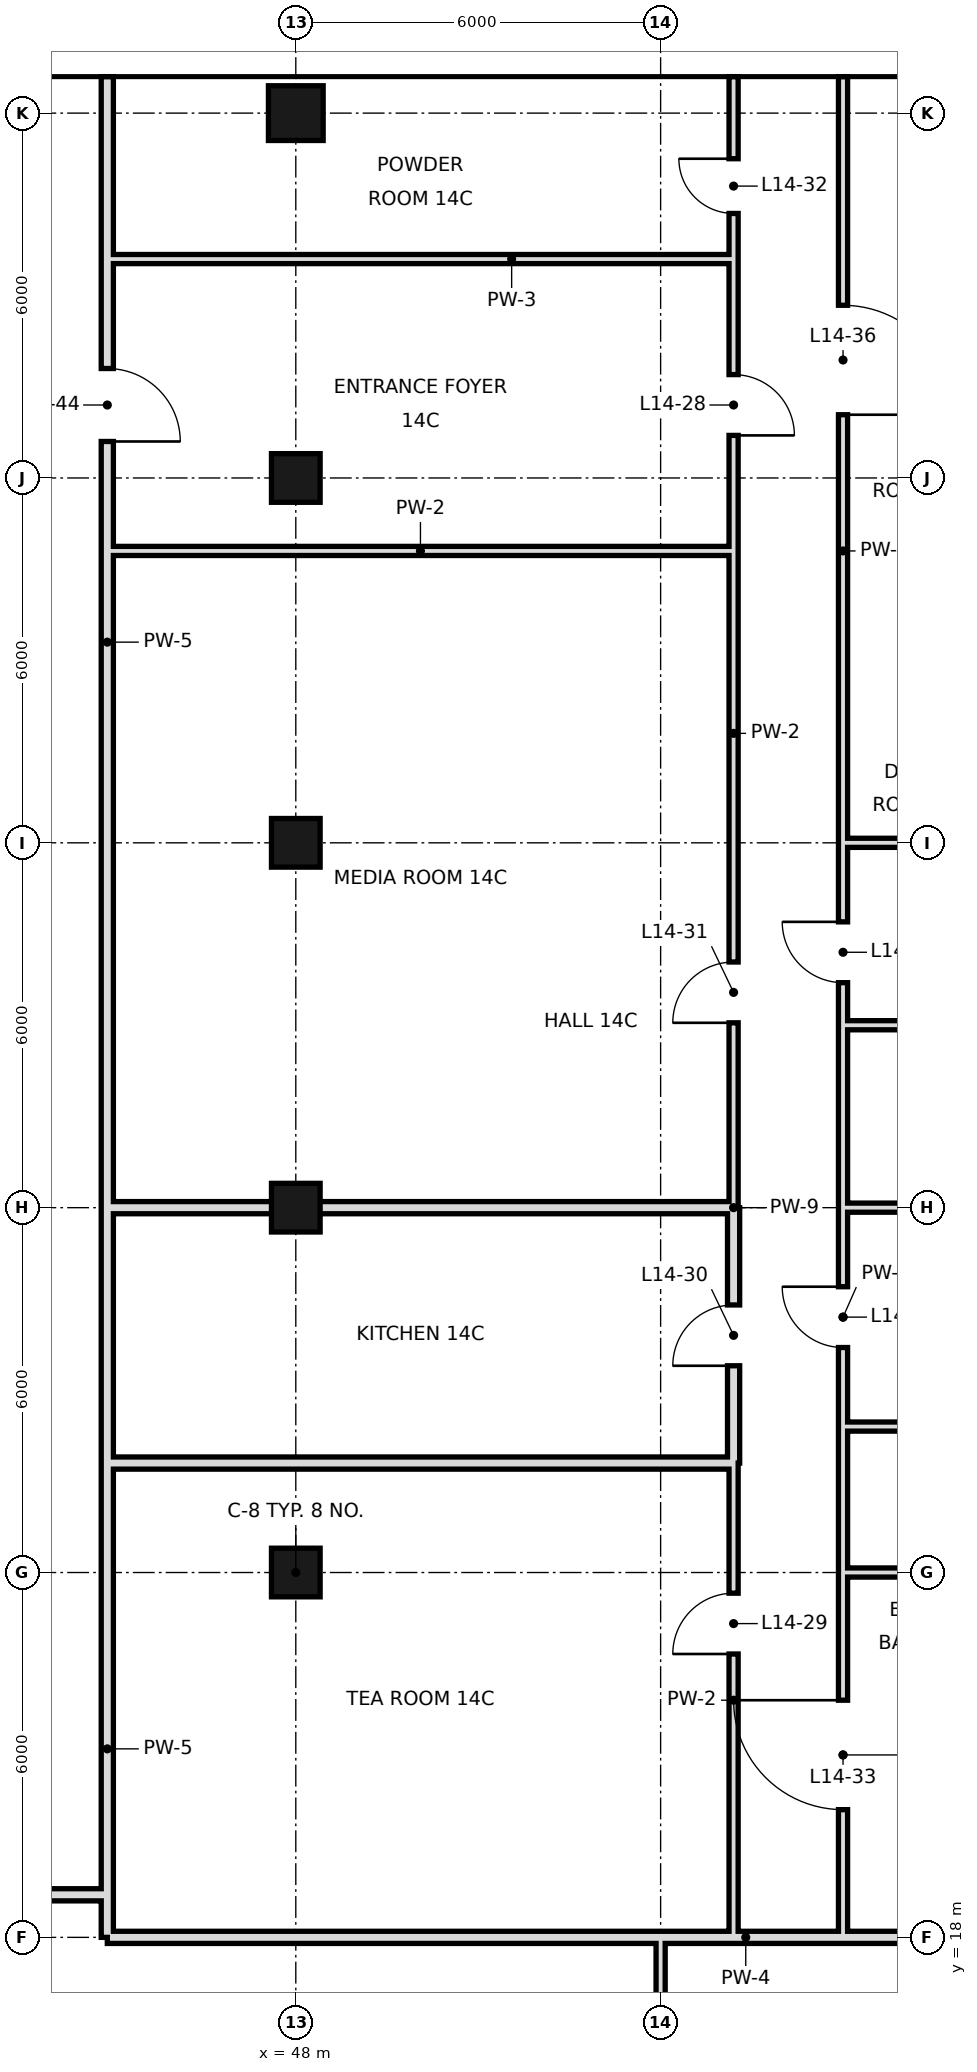
"""IFC4 building model, lengths in metres.
Left out: names, types, materials, properties, quantities, classifications, styles, units other than length and angle.
Written with IfcOpenShell. Run it as: python <this file> out.ifc"""

import sys

from ifc_helpers import new_model, si_unit, direction, frame, frame_2d, origin, origin_2d, place, context, subcontext, project, spatial, rectangle, hollow_rectangle, extrude, element, fill, save


model = new_model("IFC4")
c1 = context("Model", 3, precision=1e-05, world=origin(), true_north=direction((0.0, 1.0)))
c2 = subcontext(c1, "Body", "Model", "MODEL_VIEW")
j1 = project(units=[si_unit("LENGTHUNIT", "METRE"), si_unit("PLANEANGLEUNIT", "RADIAN")], contexts=[c1])
p1 = place(None, origin())
s1 = spatial("IfcSite", under=j1, at=p1, CompositionType="ELEMENT")
p2 = place(p1, origin())
s2 = spatial("IfcBuilding", under=s1, at=p2, CompositionType="ELEMENT")
p3 = place(p2, frame((0.0, 0.0, 71.4)))
s3 = spatial("IfcBuildingStorey", under=s2, at=p3, CompositionType="ELEMENT", Elevation=71.4)
for number, where, z_axis, x_axis in (
    (1, (48.0, 24.0, 0.0), (0.0, 0.0, 1.0), (1.0, 0.0, 0.0)),
    (2, (48.0, 30.0, 0.0), (0.0, 0.0, 1.0), (1.0, 0.0, 0.0)),
    (3, (48.0, 36.0, 0.0), (0.0, 0.0, 1.0), (1.0, 0.0, 0.0)),
    (4, (48.0, 42.0, 0.0), (0.0, 0.0, 1.0), (1.0, 0.0, 0.0)),
):
    element("IfcColumn", number, at=place(p3, frame(where, z_axis=z_axis, x_axis=x_axis)), inside=s3, PredefinedType="COLUMN", context=c2, shape_type="SweptSolid", body=[
        extrude(hollow_rectangle(XDim=0.8, YDim=0.8, WallThickness=0.04, at=origin_2d()), origin(), (0.0, 0.0, 1.0), 3.6),
    ])
p4 = place(p3, frame((48.0, 48.0, 0.0), z_axis=(0.0, 0.0, 1.0), x_axis=(1.0, 0.0, 0.0)))
e5 = element("IfcColumn", 5, at=p4, inside=s3, PredefinedType="COLUMN", context=c2, shape_type="SweptSolid", body=[
    extrude(hollow_rectangle(XDim=0.9, YDim=0.9, WallThickness=0.045, at=origin_2d()), origin(), (0.0, 0.0, 1.0), 3.6),
])
p5 = place(p3, frame((44.9, 18.7, 0.0), z_axis=(0.0, 0.0, 1.0), x_axis=(0.0, 1.0, 0.0)))
e6 = element("IfcWall", 6, at=p5, inside=s3, PredefinedType="SOLIDWALL", context=c2, shape_type="SweptSolid", body=[
    extrude(rectangle(XDim=7.1, YDim=0.2, at=frame_2d((3.55, 0.0))), origin(), (0.0, 0.0, 1.0), 3.42),
])
p6 = place(p3, frame((44.9, 30.0, 0.0), z_axis=(0.0, 0.0, 1.0), x_axis=(0.0, 1.0, 0.0)))
e7 = element("IfcWall", 7, at=p6, inside=s3, PredefinedType="SOLIDWALL", context=c2, shape_type="SweptSolid", body=[
    extrude(rectangle(XDim=18.6, YDim=0.2, at=frame_2d((9.3, 0.0))), origin(), (0.0, 0.0, 1.0), 2.72),
])
p7 = place(p6, frame((12.6, 0.0, 0.0)))
e8 = element("IfcOpeningElement", 8, at=p7, cuts=e7, PredefinedType="OPENING", context=c2, shape_type="SweptSolid", body=[
    extrude(rectangle(XDim=1.2, YDim=2.4, at=frame_2d((0.6, 1.2))), frame((0.0, 0.11, 0.0), z_axis=(0.0, -1.0, 0.0), x_axis=(1.0, 0.0, 0.0)), (0.0, 0.0, 1.0), 0.22),
])
p8 = place(p3, frame((44.9, 25.8, 0.0), z_axis=(0.0, 0.0, 1.0), x_axis=(0.0, 1.0, 0.0)))
e9 = element("IfcWall", 9, at=p8, inside=s3, PredefinedType="SOLIDWALL", context=c2, shape_type="SweptSolid", body=[
    extrude(rectangle(XDim=4.2, YDim=0.2, at=frame_2d((2.1, 0.0))), origin(), (0.0, 0.0, 1.0), 2.97),
])
p9 = place(p3, frame((44.9, 18.0, 0.0), z_axis=(0.0, 0.0, 1.0), x_axis=(0.0, 1.0, 0.0)))
e10 = element("IfcWall", 10, at=p9, inside=s3, PredefinedType="SOLIDWALL", context=c2, shape_type="SweptSolid", body=[
    extrude(rectangle(XDim=0.7, YDim=0.2, at=frame_2d((0.35, 0.0))), origin(), (0.0, 0.0, 1.0), 2.97),
])
p10 = place(p3, frame((54.0, 10.8, 0.0), z_axis=(0.0, 0.0, 1.0), x_axis=(0.0, 1.0, 0.0)))
e11 = element("IfcWall", 11, at=p10, inside=s3, PredefinedType="PARTITIONING", context=c2, shape_type="SweptSolid", body=[
    extrude(rectangle(XDim=7.2, YDim=0.15, at=frame_2d((3.6, 0.0))), origin(), (0.0, 0.0, 1.0), 3.42),
])
p11 = place(p3, frame((55.2, 25.8, 0.0), z_axis=(0.0, 0.0, 1.0), x_axis=(0.0, 1.0, 0.0)))
e12 = element("IfcWall", 12, at=p11, inside=s3, PredefinedType="SOLIDWALL", context=c2, shape_type="SweptSolid", body=[
    extrude(rectangle(XDim=4.2, YDim=0.2, at=frame_2d((2.1, 0.0))), origin(), (0.0, 0.0, 1.0), 2.52),
])
p12 = place(p11, frame((1.6, 0.0, 0.0)))
e13 = element("IfcOpeningElement", 13, at=p12, cuts=e12, PredefinedType="OPENING", context=c2, shape_type="SweptSolid", body=[
    extrude(rectangle(XDim=1.0, YDim=2.4, at=frame_2d((0.5, 1.2))), frame((0.0, 0.11, 0.0), z_axis=(0.0, -1.0, 0.0), x_axis=(1.0, 0.0, 0.0)), (0.0, 0.0, 1.0), 0.22),
])
p13 = place(p3, frame((55.2, 18.0, 0.0), z_axis=(0.0, 0.0, 1.0), x_axis=(0.0, 1.0, 0.0)))
e14 = element("IfcWall", 14, at=p13, inside=s3, PredefinedType="PARTITIONING", context=c2, shape_type="SweptSolid", body=[
    extrude(rectangle(XDim=7.8, YDim=0.15, at=frame_2d((3.9, 0.0))), origin(), (0.0, 0.0, 1.0), 3.42),
])
p14 = place(p13, frame((4.66, 0.0, 0.0)))
e15 = element("IfcOpeningElement", 15, at=p14, cuts=e14, PredefinedType="OPENING", context=c2, shape_type="SweptSolid", body=[
    extrude(rectangle(XDim=1.0, YDim=2.4, at=frame_2d((0.5, 1.2))), frame((0.0, 0.085, 0.0), z_axis=(0.0, -1.0, 0.0), x_axis=(1.0, 0.0, 0.0)), (0.0, 0.0, 1.0), 0.17),
])
p15 = place(p3, frame((55.2, 30.0, 0.0), z_axis=(0.0, 0.0, 1.0), x_axis=(0.0, 1.0, 0.0)))
e16 = element("IfcWall", 16, at=p15, inside=s3, PredefinedType="PARTITIONING", context=c2, shape_type="SweptSolid", body=[
    extrude(rectangle(XDim=15.6, YDim=0.15, at=frame_2d((7.8, 0.0))), origin(), (0.0, 0.0, 1.0), 3.42),
])
p16 = place(p15, frame((12.7, 0.0, 0.0)))
e17 = element("IfcOpeningElement", 17, at=p16, cuts=e16, PredefinedType="OPENING", context=c2, shape_type="SweptSolid", body=[
    extrude(rectangle(XDim=1.0, YDim=2.4, at=frame_2d((0.5, 1.2))), frame((0.0, 0.085, 0.0), z_axis=(0.0, -1.0, 0.0), x_axis=(1.0, 0.0, 0.0)), (0.0, 0.0, 1.0), 0.17),
])
p17 = place(p15, frame((3.04, 0.0, 0.0)))
e18 = element("IfcOpeningElement", 18, at=p17, cuts=e16, PredefinedType="OPENING", context=c2, shape_type="SweptSolid", body=[
    extrude(rectangle(XDim=1.0, YDim=2.4, at=frame_2d((0.5, 1.2))), frame((0.0, 0.085, 0.0), z_axis=(0.0, -1.0, 0.0), x_axis=(1.0, 0.0, 0.0)), (0.0, 0.0, 1.0), 0.17),
])
p18 = place(p3, frame((55.2, 45.6, 0.0), z_axis=(0.0, 0.0, 1.0), x_axis=(0.0, 1.0, 0.0)))
e19 = element("IfcWall", 19, at=p18, inside=s3, PredefinedType="PARTITIONING", context=c2, shape_type="SweptSolid", body=[
    extrude(rectangle(XDim=3.0, YDim=0.15, at=frame_2d((1.5, 0.0))), origin(), (0.0, 0.0, 1.0), 3.42),
])
p19 = place(p18, frame((0.75, 0.0, 0.0)))
e20 = element("IfcOpeningElement", 20, at=p19, cuts=e19, PredefinedType="OPENING", context=c2, shape_type="SweptSolid", body=[
    extrude(rectangle(XDim=0.9, YDim=2.4, at=frame_2d((0.45, 1.2))), frame((0.0, 0.085, 0.0), z_axis=(0.0, -1.0, 0.0), x_axis=(1.0, 0.0, 0.0)), (0.0, 0.0, 1.0), 0.17),
])
p20 = place(p3, frame((57.0, 18.0, 0.0), z_axis=(0.0, 0.0, 1.0), x_axis=(0.0, 1.0, 0.0)))
e21 = element("IfcWall", 21, at=p20, inside=s3, PredefinedType="PARTITIONING", context=c2, shape_type="SweptSolid", body=[
    extrude(rectangle(XDim=6.0, YDim=0.15, at=frame_2d((3.0, 0.0))), origin(), (0.0, 0.0, 1.0), 3.42),
])
p21 = place(p20, frame((2.1, 0.0, 0.0)))
e22 = element("IfcOpeningElement", 22, at=p21, cuts=e21, PredefinedType="OPENING", context=c2, shape_type="SweptSolid", body=[
    extrude(rectangle(XDim=1.8, YDim=2.4, at=frame_2d((0.9, 1.2))), frame((0.0, 0.085, 0.0), z_axis=(0.0, -1.0, 0.0), x_axis=(1.0, 0.0, 0.0)), (0.0, 0.0, 1.0), 0.17),
])
p22 = place(p3, frame((57.0, 26.4, 0.0), z_axis=(0.0, 0.0, 1.0), x_axis=(0.0, 1.0, 0.0)))
e23 = element("IfcWall", 23, at=p22, inside=s3, PredefinedType="PARTITIONING", context=c2, shape_type="SweptSolid", body=[
    extrude(rectangle(XDim=3.6, YDim=0.15, at=frame_2d((1.8, 0.0))), origin(), (0.0, 0.0, 1.0), 3.42),
])
p23 = place(p22, frame((1.3, 0.0, 0.0)))
e24 = element("IfcOpeningElement", 24, at=p23, cuts=e23, PredefinedType="OPENING", context=c2, shape_type="SweptSolid", body=[
    extrude(rectangle(XDim=1.0, YDim=2.4, at=frame_2d((0.5, 1.2))), frame((0.0, 0.085, 0.0), z_axis=(0.0, -1.0, 0.0), x_axis=(1.0, 0.0, 0.0)), (0.0, 0.0, 1.0), 0.17),
])
p24 = place(p3, frame((57.0, 33.0, 0.0), z_axis=(0.0, 0.0, 1.0), x_axis=(0.0, 1.0, 0.0)))
e25 = element("IfcWall", 25, at=p24, inside=s3, PredefinedType="PARTITIONING", context=c2, shape_type="SweptSolid", body=[
    extrude(rectangle(XDim=15.6, YDim=0.15, at=frame_2d((7.8, 0.0))), origin(), (0.0, 0.0, 1.0), 3.42),
])
p25 = place(p24, frame((0.7, 0.0, 0.0)))
e26 = element("IfcOpeningElement", 26, at=p25, cuts=e25, PredefinedType="OPENING", context=c2, shape_type="SweptSolid", body=[
    extrude(rectangle(XDim=1.0, YDim=2.4, at=frame_2d((0.5, 1.2))), frame((0.0, 0.085, 0.0), z_axis=(0.0, -1.0, 0.0), x_axis=(1.0, 0.0, 0.0)), (0.0, 0.0, 1.0), 0.17),
])
p26 = place(p24, frame((10.04, 0.0, 0.0)))
e27 = element("IfcOpeningElement", 27, at=p26, cuts=e25, PredefinedType="OPENING", context=c2, shape_type="SweptSolid", body=[
    extrude(rectangle(XDim=1.8, YDim=2.4, at=frame_2d((0.9, 1.2))), frame((0.0, 0.085, 0.0), z_axis=(0.0, -1.0, 0.0), x_axis=(1.0, 0.0, 0.0)), (0.0, 0.0, 1.0), 0.17),
])
p27 = place(p3, frame((57.0, 24.0, 0.0), z_axis=(0.0, 0.0, 1.0), x_axis=(0.0, 1.0, 0.0)))
e28 = element("IfcWall", 28, at=p27, inside=s3, PredefinedType="PARTITIONING", context=c2, shape_type="SweptSolid", body=[
    extrude(rectangle(XDim=2.4, YDim=0.15, at=frame_2d((1.2, 0.0))), origin(), (0.0, 0.0, 1.0), 3.42),
])
p28 = place(p3, frame((57.0, 30.0, 0.0), z_axis=(0.0, 0.0, 1.0), x_axis=(0.0, 1.0, 0.0)))
e29 = element("IfcWall", 29, at=p28, inside=s3, PredefinedType="PARTITIONING", context=c2, shape_type="SweptSolid", body=[
    extrude(rectangle(XDim=3.0, YDim=0.15, at=frame_2d((1.5, 0.0))), origin(), (0.0, 0.0, 1.0), 3.42),
])
p29 = place(p3, frame((44.9, 18.0, 0.0), z_axis=(0.0, 0.0, 1.0), x_axis=(1.0, 0.0, 0.0)))
e30 = element("IfcWall", 30, at=p29, inside=s3, PredefinedType="SOLIDWALL", context=c2, shape_type="SweptSolid", body=[
    extrude(rectangle(XDim=21.7, YDim=0.2, at=frame_2d((10.85, 0.0))), origin(), (0.0, 0.0, 1.0), 2.52),
])
p30 = place(p3, frame((42.6, 18.7, 0.0), z_axis=(0.0, 0.0, 1.0), x_axis=(1.0, 0.0, 0.0)))
e31 = element("IfcWall", 31, at=p30, inside=s3, PredefinedType="SOLIDWALL", context=c2, shape_type="SweptSolid", body=[
    extrude(rectangle(XDim=2.3, YDim=0.2, at=frame_2d((1.15, 0.0))), origin(), (0.0, 0.0, 1.0), 3.42),
])
p31 = place(p3, frame((57.0, 24.0, 0.0), z_axis=(0.0, 0.0, 1.0), x_axis=(1.0, 0.0, 0.0)))
e32 = element("IfcWall", 32, at=p31, inside=s3, PredefinedType="PARTITIONING", context=c2, shape_type="SweptSolid", body=[
    extrude(rectangle(XDim=3.0, YDim=0.15, at=frame_2d((1.5, 0.0))), origin(), (0.0, 0.0, 1.0), 2.52),
])
p32 = place(p3, frame((44.9, 25.8, 0.0), z_axis=(0.0, 0.0, 1.0), x_axis=(1.0, 0.0, 0.0)))
e33 = element("IfcWall", 33, at=p32, inside=s3, PredefinedType="SOLIDWALL", context=c2, shape_type="SweptSolid", body=[
    extrude(rectangle(XDim=10.3, YDim=0.2, at=frame_2d((5.15, 0.0))), origin(), (0.0, 0.0, 1.0), 2.97),
])
p33 = place(p3, frame((57.0, 26.4, 0.0), z_axis=(0.0, 0.0, 1.0), x_axis=(1.0, 0.0, 0.0)))
e34 = element("IfcWall", 34, at=p33, inside=s3, PredefinedType="PARTITIONING", context=c2, shape_type="SweptSolid", body=[
    extrude(rectangle(XDim=3.0, YDim=0.15, at=frame_2d((1.5, 0.0))), origin(), (0.0, 0.0, 1.0), 3.42),
])
p34 = place(p3, frame((44.9, 30.0, 0.0), z_axis=(0.0, 0.0, 1.0), x_axis=(1.0, 0.0, 0.0)))
e35 = element("IfcWall", 35, at=p34, inside=s3, PredefinedType="SOLIDWALL", context=c2, shape_type="SweptSolid", body=[
    extrude(rectangle(XDim=10.3, YDim=0.2, at=frame_2d((5.15, 0.0))), origin(), (0.0, 0.0, 1.0), 2.52),
])
p35 = place(p3, frame((57.0, 30.0, 0.0), z_axis=(0.0, 0.0, 1.0), x_axis=(1.0, 0.0, 0.0)))
e36 = element("IfcWall", 36, at=p35, inside=s3, PredefinedType="PARTITIONING", context=c2, shape_type="SweptSolid", body=[
    extrude(rectangle(XDim=3.0, YDim=0.15, at=frame_2d((1.5, 0.0))), origin(), (0.0, 0.0, 1.0), 2.52),
])
p36 = place(p3, frame((57.0, 33.0, 0.0), z_axis=(0.0, 0.0, 1.0), x_axis=(1.0, 0.0, 0.0)))
e37 = element("IfcWall", 37, at=p36, inside=s3, PredefinedType="PARTITIONING", context=c2, shape_type="SweptSolid", body=[
    extrude(rectangle(XDim=3.0, YDim=0.15, at=frame_2d((1.5, 0.0))), origin(), (0.0, 0.0, 1.0), 3.42),
])
p37 = place(p3, frame((57.0, 36.0, 0.0), z_axis=(0.0, 0.0, 1.0), x_axis=(1.0, 0.0, 0.0)))
e38 = element("IfcWall", 38, at=p37, inside=s3, PredefinedType="PARTITIONING", context=c2, shape_type="SweptSolid", body=[
    extrude(rectangle(XDim=9.0, YDim=0.15, at=frame_2d((4.5, 0.0))), origin(), (0.0, 0.0, 1.0), 2.52),
])
for number, where, z_axis, x_axis in (
    (39, (44.9, 40.8, 0.0), (0.0, 0.0, 1.0), (1.0, 0.0, 0.0)),
    (40, (44.9, 45.6, 0.0), (0.0, 0.0, 1.0), (1.0, 0.0, 0.0)),
):
    element("IfcWall", number, at=place(p3, frame(where, z_axis=z_axis, x_axis=x_axis)), inside=s3, PredefinedType="PARTITIONING", context=c2, shape_type="SweptSolid", body=[
        extrude(rectangle(XDim=10.3, YDim=0.15, at=frame_2d((5.15, 0.0))), origin(), (0.0, 0.0, 1.0), 3.42),
    ])
p38 = place(p16, frame((1.0, 0.0, 0.0), z_axis=(0.0, 0.0, 1.0), x_axis=(-1.0, 0.0, 0.0)))
e41 = element("IfcDoor", 41, at=p38, inside=s3, OperationType="SINGLE_SWING_RIGHT", PredefinedType="DOOR", context=c2, shape_type="SweptSolid", body=[
    extrude(rectangle(XDim=1.0, YDim=2.4, at=frame_2d((0.5, 1.2))), frame((0.0, 0.025, 0.0), z_axis=(0.0, -1.0, 0.0), x_axis=(1.0, 0.0, 0.0)), (0.0, 0.0, 1.0), 0.05),
])
fill(e17, e41)
p39 = place(p14, origin())
e42 = element("IfcDoor", 42, at=p39, inside=s3, OperationType="SINGLE_SWING_LEFT", PredefinedType="DOOR", context=c2, shape_type="SweptSolid", body=[
    extrude(rectangle(XDim=1.0, YDim=2.4, at=frame_2d((0.5, 1.2))), frame((0.0, 0.025, 0.0), z_axis=(0.0, -1.0, 0.0), x_axis=(1.0, 0.0, 0.0)), (0.0, 0.0, 1.0), 0.05),
])
fill(e15, e42)
p40 = place(p12, origin())
e43 = element("IfcDoor", 43, at=p40, inside=s3, OperationType="SINGLE_SWING_LEFT", PredefinedType="DOOR", context=c2, shape_type="SweptSolid", body=[
    extrude(rectangle(XDim=1.0, YDim=2.4, at=frame_2d((0.5, 1.2))), frame((0.0, 0.025, 0.0), z_axis=(0.0, -1.0, 0.0), x_axis=(1.0, 0.0, 0.0)), (0.0, 0.0, 1.0), 0.05),
])
fill(e13, e43)
p41 = place(p17, origin())
e44 = element("IfcDoor", 44, at=p41, inside=s3, OperationType="SINGLE_SWING_LEFT", PredefinedType="DOOR", context=c2, shape_type="SweptSolid", body=[
    extrude(rectangle(XDim=1.0, YDim=2.4, at=frame_2d((0.5, 1.2))), frame((0.0, 0.025, 0.0), z_axis=(0.0, -1.0, 0.0), x_axis=(1.0, 0.0, 0.0)), (0.0, 0.0, 1.0), 0.05),
])
fill(e18, e44)
p42 = place(p19, frame((0.9, 0.0, 0.0), z_axis=(0.0, 0.0, 1.0), x_axis=(-1.0, 0.0, 0.0)))
e45 = element("IfcDoor", 45, at=p42, inside=s3, OperationType="SINGLE_SWING_LEFT", PredefinedType="DOOR", context=c2, shape_type="SweptSolid", body=[
    extrude(rectangle(XDim=0.9, YDim=2.4, at=frame_2d((0.45, 1.2))), frame((0.0, 0.025, 0.0), z_axis=(0.0, -1.0, 0.0), x_axis=(1.0, 0.0, 0.0)), (0.0, 0.0, 1.0), 0.05),
])
fill(e20, e45)
p43 = place(p21, frame((1.8, 0.0, 0.0), z_axis=(0.0, 0.0, 1.0), x_axis=(-1.0, 0.0, 0.0)))
e46 = element("IfcDoor", 46, at=p43, inside=s3, OperationType="SINGLE_SWING_LEFT", PredefinedType="DOOR", context=c2, shape_type="SweptSolid", body=[
    extrude(rectangle(XDim=1.8, YDim=2.4, at=frame_2d((0.9, 1.2))), frame((0.0, 0.025, 0.0), z_axis=(0.0, -1.0, 0.0), x_axis=(1.0, 0.0, 0.0)), (0.0, 0.0, 1.0), 0.05),
])
fill(e22, e46)
p44 = place(p23, frame((1.0, 0.0, 0.0), z_axis=(0.0, 0.0, 1.0), x_axis=(-1.0, 0.0, 0.0)))
e47 = element("IfcDoor", 47, at=p44, inside=s3, OperationType="SINGLE_SWING_LEFT", PredefinedType="DOOR", context=c2, shape_type="SweptSolid", body=[
    extrude(rectangle(XDim=1.0, YDim=2.4, at=frame_2d((0.5, 1.2))), frame((0.0, 0.025, 0.0), z_axis=(0.0, -1.0, 0.0), x_axis=(1.0, 0.0, 0.0)), (0.0, 0.0, 1.0), 0.05),
])
fill(e24, e47)
p45 = place(p25, frame((1.0, 0.0, 0.0), z_axis=(0.0, 0.0, 1.0), x_axis=(-1.0, 0.0, 0.0)))
e48 = element("IfcDoor", 48, at=p45, inside=s3, OperationType="SINGLE_SWING_LEFT", PredefinedType="DOOR", context=c2, shape_type="SweptSolid", body=[
    extrude(rectangle(XDim=1.0, YDim=2.4, at=frame_2d((0.5, 1.2))), frame((0.0, 0.025, 0.0), z_axis=(0.0, -1.0, 0.0), x_axis=(1.0, 0.0, 0.0)), (0.0, 0.0, 1.0), 0.05),
])
fill(e26, e48)
p46 = place(p26, frame((1.8, 0.0, 0.0), z_axis=(0.0, 0.0, 1.0), x_axis=(-1.0, 0.0, 0.0)))
e49 = element("IfcDoor", 49, at=p46, inside=s3, OperationType="SINGLE_SWING_RIGHT", PredefinedType="DOOR", context=c2, shape_type="SweptSolid", body=[
    extrude(rectangle(XDim=1.8, YDim=2.4, at=frame_2d((0.9, 1.2))), frame((0.0, 0.025, 0.0), z_axis=(0.0, -1.0, 0.0), x_axis=(1.0, 0.0, 0.0)), (0.0, 0.0, 1.0), 0.05),
])
fill(e27, e49)
p47 = place(p7, frame((1.2, 0.0, 0.0), z_axis=(0.0, 0.0, 1.0), x_axis=(-1.0, 0.0, 0.0)))
e50 = element("IfcDoor", 50, at=p47, inside=s3, OperationType="SINGLE_SWING_RIGHT", PredefinedType="DOOR", context=c2, shape_type="SweptSolid", body=[
    extrude(rectangle(XDim=1.2, YDim=2.4, at=frame_2d((0.6, 1.2))), frame((0.0, 0.025, 0.0), z_axis=(0.0, -1.0, 0.0), x_axis=(1.0, 0.0, 0.0)), (0.0, 0.0, 1.0), 0.05),
])
fill(e8, e50)
save(model, sys.argv[1])
